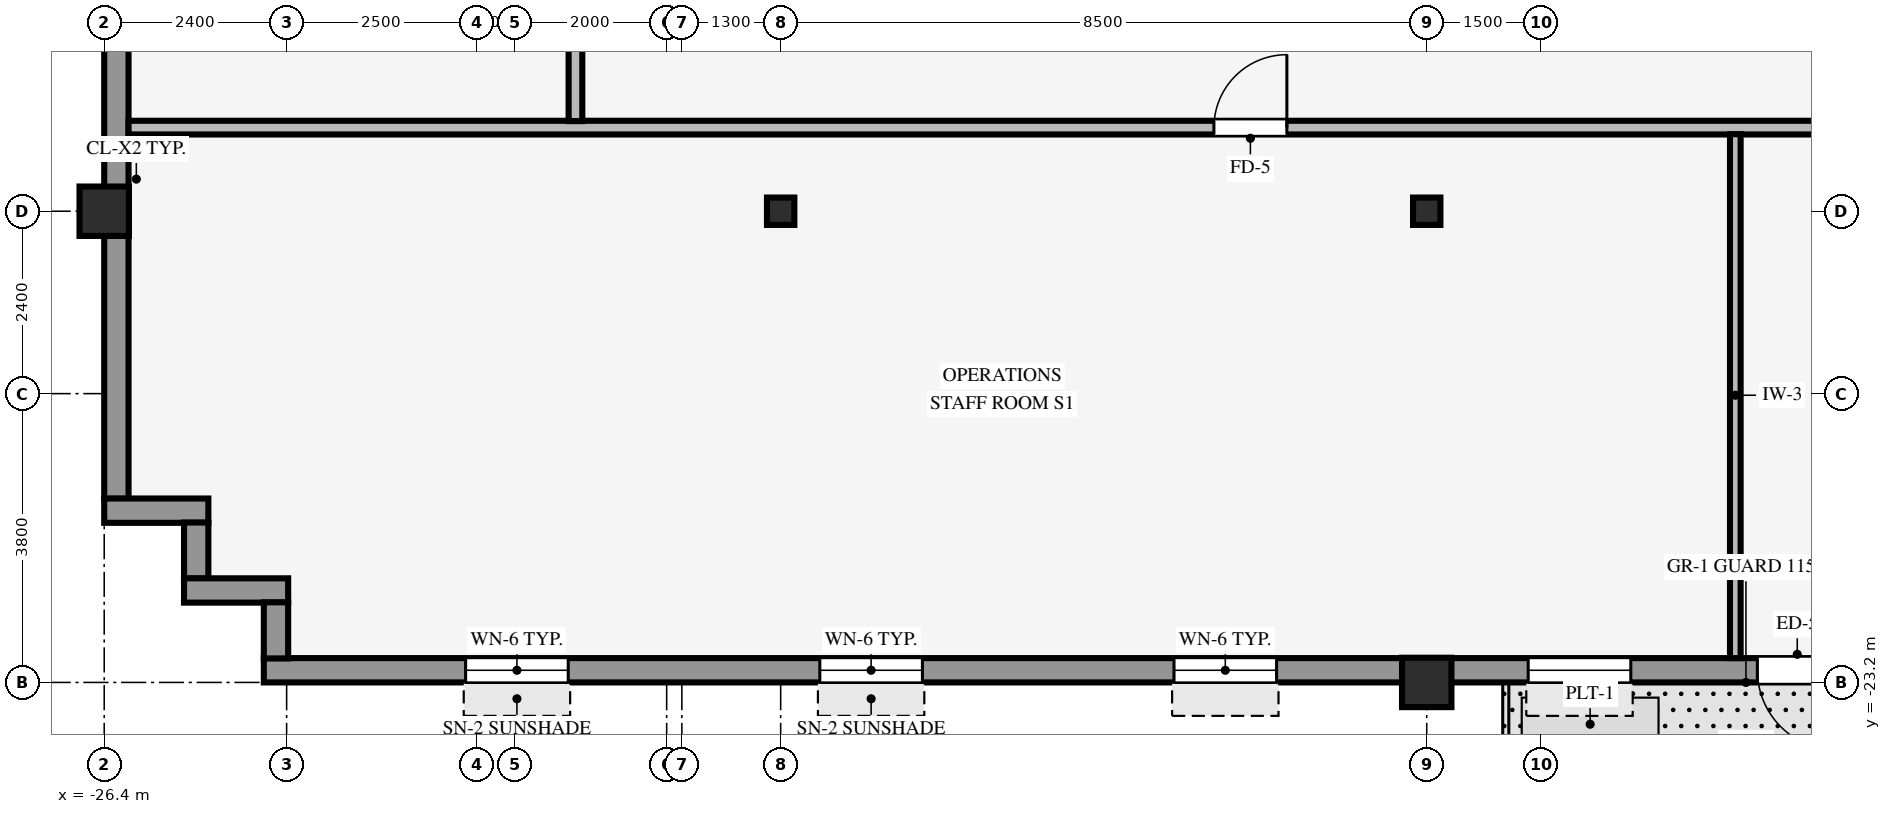
"""IFC4 building model, lengths in metres.
Left out: names, types, materials, properties, quantities, classifications, styles, units other than length and angle.
Written with IfcOpenShell. Run it as: python <this file> out.ifc"""

import sys

from ifc_helpers import new_model, si_unit, direction, frame, frame_2d, origin, origin_2d, place, context, subcontext, project, spatial, rectangle, hollow_rectangle, i_section, extrude, source, transform, mapped, element, fill, save


model = new_model("IFC4")
c1 = context("Model", 3, precision=1e-05, world=origin(), true_north=direction((0.0, 1.0)))
c2 = subcontext(c1, "Body", "Model", "MODEL_VIEW")
j1 = project(units=[si_unit("LENGTHUNIT", "METRE"), si_unit("PLANEANGLEUNIT", "RADIAN")], contexts=[c1])
p1 = place(None, origin())
s1 = spatial("IfcSite", under=j1, at=p1, CompositionType="ELEMENT")
p2 = place(p1, origin())
s2 = spatial("IfcBuilding", under=s1, at=p2, CompositionType="ELEMENT")
p3 = place(p2, frame((0.0, 0.0, 134.8)))
s3 = spatial("IfcBuildingStorey", under=s2, at=p3, CompositionType="ELEMENT", Elevation=134.8)
for number, where, z_axis, x_axis in (
    (1, (-26.4, -17.0, 0.0), (0.0, 0.0, 1.0), (1.0, 0.0, 0.0)),
    (2, (-9.0, -23.2, 0.0), (0.0, 0.0, 1.0), (1.0, 0.0, 0.0)),
):
    element("IfcColumn", number, at=place(p3, frame(where, z_axis=z_axis, x_axis=x_axis)), inside=s3, PredefinedType="COLUMN", context=c2, shape_type="SweptSolid", body=[
        extrude(hollow_rectangle(XDim=0.65, YDim=0.65, WallThickness=0.04, InnerFilletRadius=0.04, OuterFilletRadius=0.08, at=origin_2d()), origin(), (0.0, 0.0, 1.0), 3.37),
    ])
for number, where, z_axis, x_axis in (
    (3, (-17.5, -17.0, 0.0), (0.0, 0.0, 1.0), (1.0, 0.0, 0.0)),
    (4, (-9.0, -17.0, 0.0), (0.0, 0.0, 1.0), (1.0, 0.0, 0.0)),
):
    element("IfcColumn", number, at=place(p3, frame(where, z_axis=z_axis, x_axis=x_axis)), inside=s3, PredefinedType="COLUMN", context=c2, shape_type="SweptSolid", body=[
        extrude(i_section(OverallWidth=0.36, OverallDepth=0.36, WebThickness=0.021, FlangeThickness=0.021, FilletRadius=0.018, at=origin_2d()), origin(), (0.0, 0.0, 1.0), 3.37),
    ])
p4 = place(p3, frame((-24.3, -23.04, 0.0), z_axis=(0.0, 0.0, 1.0), x_axis=(1.0, 0.0, 0.0)))
e5 = element("IfcWall", 5, at=p4, inside=s3, PredefinedType="STANDARD", context=c2, shape_type="SweptSolid", body=[
    extrude(rectangle(XDim=48.6, YDim=0.32, at=frame_2d((24.3, 0.0))), origin(), (0.0, 0.0, 1.0), 2.705),
])
p5 = place(p4, frame((20.7, 0.0, 0.0), z_axis=(0.0, 0.0, 1.0), x_axis=(-1.0, 0.0, 0.0)))
e6 = element("IfcOpeningElement", 6, at=p5, cuts=e5, PredefinedType="OPENING", context=c2, shape_type="SweptSolid", body=[
    extrude(rectangle(XDim=1.05, YDim=2.1, at=frame_2d((0.525, 1.05))), frame((0.0, 0.17, 0.0), z_axis=(0.0, -1.0, 0.0), x_axis=(1.0, 0.0, 0.0)), (0.0, 0.0, 1.0), 0.34),
])
p6 = place(p4, frame((2.655, 0.0, 0.8)))
e7 = element("IfcOpeningElement", 7, at=p6, cuts=e5, PredefinedType="OPENING", context=c2, shape_type="SweptSolid", body=[
    extrude(rectangle(XDim=1.35, YDim=1.56, at=frame_2d((0.675, 0.78))), frame((0.0, 0.17, 0.0), z_axis=(0.0, -1.0, 0.0), x_axis=(1.0, 0.0, 0.0)), (0.0, 0.0, 1.0), 0.34),
])
p7 = place(p4, frame((7.315, 0.0, 0.8)))
e8 = element("IfcOpeningElement", 8, at=p7, cuts=e5, PredefinedType="OPENING", context=c2, shape_type="SweptSolid", body=[
    extrude(rectangle(XDim=1.35, YDim=1.56, at=frame_2d((0.675, 0.78))), frame((0.0, 0.17, 0.0), z_axis=(0.0, -1.0, 0.0), x_axis=(1.0, 0.0, 0.0)), (0.0, 0.0, 1.0), 0.34),
])
p8 = place(p4, frame((11.975, 0.0, 0.8)))
e9 = element("IfcOpeningElement", 9, at=p8, cuts=e5, PredefinedType="OPENING", context=c2, shape_type="SweptSolid", body=[
    extrude(rectangle(XDim=1.35, YDim=1.56, at=frame_2d((0.675, 0.78))), frame((0.0, 0.17, 0.0), z_axis=(0.0, -1.0, 0.0), x_axis=(1.0, 0.0, 0.0)), (0.0, 0.0, 1.0), 0.34),
])
p9 = place(p4, frame((16.635, 0.0, 0.8)))
e10 = element("IfcOpeningElement", 10, at=p9, cuts=e5, PredefinedType="OPENING", context=c2, shape_type="SweptSolid", body=[
    extrude(rectangle(XDim=1.35, YDim=1.56, at=frame_2d((0.675, 0.78))), frame((0.0, 0.17, 0.0), z_axis=(0.0, -1.0, 0.0), x_axis=(1.0, 0.0, 0.0)), (0.0, 0.0, 1.0), 0.34),
])
p10 = place(p4, frame((21.295, 0.0, 0.8)))
e11 = element("IfcOpeningElement", 11, at=p10, cuts=e5, PredefinedType="OPENING", context=c2, shape_type="SweptSolid", body=[
    extrude(rectangle(XDim=1.35, YDim=1.56, at=frame_2d((0.675, 0.78))), frame((0.0, 0.17, 0.0), z_axis=(0.0, -1.0, 0.0), x_axis=(1.0, 0.0, 0.0)), (0.0, 0.0, 1.0), 0.34),
])
p11 = place(p4, frame((25.955, 0.0, 0.8)))
e12 = element("IfcOpeningElement", 12, at=p11, cuts=e5, PredefinedType="OPENING", context=c2, shape_type="SweptSolid", body=[
    extrude(rectangle(XDim=1.35, YDim=1.56, at=frame_2d((0.675, 0.78))), frame((0.0, 0.17, 0.0), z_axis=(0.0, -1.0, 0.0), x_axis=(1.0, 0.0, 0.0)), (0.0, 0.0, 1.0), 0.34),
])
p12 = place(p4, frame((30.615, 0.0, 0.8)))
e13 = element("IfcOpeningElement", 13, at=p12, cuts=e5, PredefinedType="OPENING", context=c2, shape_type="SweptSolid", body=[
    extrude(rectangle(XDim=1.35, YDim=1.56, at=frame_2d((0.675, 0.78))), frame((0.0, 0.17, 0.0), z_axis=(0.0, -1.0, 0.0), x_axis=(1.0, 0.0, 0.0)), (0.0, 0.0, 1.0), 0.34),
])
p13 = place(p4, frame((35.275, 0.0, 0.8)))
e14 = element("IfcOpeningElement", 14, at=p13, cuts=e5, PredefinedType="OPENING", context=c2, shape_type="SweptSolid", body=[
    extrude(rectangle(XDim=1.35, YDim=1.56, at=frame_2d((0.675, 0.78))), frame((0.0, 0.17, 0.0), z_axis=(0.0, -1.0, 0.0), x_axis=(1.0, 0.0, 0.0)), (0.0, 0.0, 1.0), 0.34),
])
p14 = place(p4, frame((39.935, 0.0, 0.8)))
e15 = element("IfcOpeningElement", 15, at=p14, cuts=e5, PredefinedType="OPENING", context=c2, shape_type="SweptSolid", body=[
    extrude(rectangle(XDim=1.35, YDim=1.56, at=frame_2d((0.675, 0.78))), frame((0.0, 0.17, 0.0), z_axis=(0.0, -1.0, 0.0), x_axis=(1.0, 0.0, 0.0)), (0.0, 0.0, 1.0), 0.34),
])
p15 = place(p4, frame((44.595, 0.0, 0.8)))
e16 = element("IfcOpeningElement", 16, at=p15, cuts=e5, PredefinedType="OPENING", context=c2, shape_type="SweptSolid", body=[
    extrude(rectangle(XDim=1.35, YDim=1.56, at=frame_2d((0.675, 0.78))), frame((0.0, 0.17, 0.0), z_axis=(0.0, -1.0, 0.0), x_axis=(1.0, 0.0, 0.0)), (0.0, 0.0, 1.0), 0.34),
])
p16 = place(p3, frame((-26.24, -20.784, 0.0), z_axis=(0.0, 0.0, 1.0), x_axis=(0.0, 1.0, 0.0)))
e17 = element("IfcWall", 17, at=p16, inside=s3, PredefinedType="STANDARD", context=c2, shape_type="SweptSolid", body=[
    extrude(rectangle(XDim=41.568, YDim=0.32, at=frame_2d((20.784, 0.0))), origin(), (0.0, 0.0, 1.0), 2.705),
])
p17 = place(p16, frame((7.369, 0.0, 0.8)))
e18 = element("IfcOpeningElement", 18, at=p17, cuts=e17, PredefinedType="OPENING", context=c2, shape_type="SweptSolid", body=[
    extrude(rectangle(XDim=2.1, YDim=1.56, at=frame_2d((1.05, 0.78))), frame((0.0, 0.17, 0.0), z_axis=(0.0, -1.0, 0.0), x_axis=(1.0, 0.0, 0.0)), (0.0, 0.0, 1.0), 0.34),
])
p18 = place(p16, frame((12.315, 0.0, 0.8)))
e19 = element("IfcOpeningElement", 19, at=p18, cuts=e17, PredefinedType="OPENING", context=c2, shape_type="SweptSolid", body=[
    extrude(rectangle(XDim=2.1, YDim=1.56, at=frame_2d((1.05, 0.78))), frame((0.0, 0.17, 0.0), z_axis=(0.0, -1.0, 0.0), x_axis=(1.0, 0.0, 0.0)), (0.0, 0.0, 1.0), 0.34),
])
p19 = place(p16, frame((17.711, 0.0, 0.8)))
e20 = element("IfcOpeningElement", 20, at=p19, cuts=e17, PredefinedType="OPENING", context=c2, shape_type="SweptSolid", body=[
    extrude(rectangle(XDim=2.1, YDim=1.56, at=frame_2d((1.05, 0.78))), frame((0.0, 0.17, 0.0), z_axis=(0.0, -1.0, 0.0), x_axis=(1.0, 0.0, 0.0)), (0.0, 0.0, 1.0), 0.34),
])
p20 = place(p16, frame((22.207, 0.0, 0.8)))
e21 = element("IfcOpeningElement", 21, at=p20, cuts=e17, PredefinedType="OPENING", context=c2, shape_type="SweptSolid", body=[
    extrude(rectangle(XDim=2.1, YDim=1.56, at=frame_2d((1.05, 0.78))), frame((0.0, 0.17, 0.0), z_axis=(0.0, -1.0, 0.0), x_axis=(1.0, 0.0, 0.0)), (0.0, 0.0, 1.0), 0.34),
])
p21 = place(p16, frame((27.153, 0.0, 0.8)))
e22 = element("IfcOpeningElement", 22, at=p21, cuts=e17, PredefinedType="OPENING", context=c2, shape_type="SweptSolid", body=[
    extrude(rectangle(XDim=2.1, YDim=1.56, at=frame_2d((1.05, 0.78))), frame((0.0, 0.17, 0.0), z_axis=(0.0, -1.0, 0.0), x_axis=(1.0, 0.0, 0.0)), (0.0, 0.0, 1.0), 0.34),
])
p22 = place(p16, frame((32.099, 0.0, 0.8)))
e23 = element("IfcOpeningElement", 23, at=p22, cuts=e17, PredefinedType="OPENING", context=c2, shape_type="SweptSolid", body=[
    extrude(rectangle(XDim=2.1, YDim=1.56, at=frame_2d((1.05, 0.78))), frame((0.0, 0.17, 0.0), z_axis=(0.0, -1.0, 0.0), x_axis=(1.0, 0.0, 0.0)), (0.0, 0.0, 1.0), 0.34),
])
p23 = place(p3, frame((-26.4, -20.94, 0.0), z_axis=(0.0, 0.0, 1.0), x_axis=(1.0, 0.0, 0.0)))
e24 = element("IfcWall", 24, at=p23, inside=s3, PredefinedType="STANDARD", context=c2, shape_type="SweptSolid", body=[
    extrude(rectangle(XDim=1.37, YDim=0.32, at=frame_2d((0.685, 0.0))), origin(), (0.0, 0.0, 1.0), 3.36),
])
p24 = place(p3, frame((-25.19, -21.834, 0.0), z_axis=(0.0, 0.0, 1.0), x_axis=(0.0, 1.0, 0.0)))
e25 = element("IfcWall", 25, at=p24, inside=s3, PredefinedType="STANDARD", context=c2, shape_type="SweptSolid", body=[
    extrude(rectangle(XDim=0.738, YDim=0.32, at=frame_2d((0.369, 0.0))), origin(), (0.0, 0.0, 1.0), 3.36),
])
p25 = place(p3, frame((-25.35, -21.99, 0.0), z_axis=(0.0, 0.0, 1.0), x_axis=(1.0, 0.0, 0.0)))
e26 = element("IfcWall", 26, at=p25, inside=s3, PredefinedType="STANDARD", context=c2, shape_type="SweptSolid", body=[
    extrude(rectangle(XDim=1.37, YDim=0.32, at=frame_2d((0.685, 0.0))), origin(), (0.0, 0.0, 1.0), 3.36),
])
p26 = place(p3, frame((-24.14, -22.884, 0.0), z_axis=(0.0, 0.0, 1.0), x_axis=(0.0, 1.0, 0.0)))
e27 = element("IfcWall", 27, at=p26, inside=s3, PredefinedType="STANDARD", context=c2, shape_type="SweptSolid", body=[
    extrude(rectangle(XDim=0.738, YDim=0.32, at=frame_2d((0.369, 0.0))), origin(), (0.0, 0.0, 1.0), 3.36),
])
p27 = place(p3, frame((-26.08, -15.9, 0.0), z_axis=(0.0, 0.0, 1.0), x_axis=(1.0, 0.0, 0.0)))
e28 = element("IfcWall", 28, at=p27, inside=s3, PredefinedType="PARTITIONING", context=c2, shape_type="SweptSolid", body=[
    extrude(rectangle(XDim=52.16, YDim=0.18, at=frame_2d((26.08, 0.0))), origin(), (0.0, 0.0, 1.0), 3.36),
])
p28 = place(p27, frame((14.28, 0.0, 0.0)))
e29 = element("IfcOpeningElement", 29, at=p28, cuts=e28, PredefinedType="OPENING", context=c2, shape_type="SweptSolid", body=[
    extrude(rectangle(XDim=0.96, YDim=2.1, at=frame_2d((0.48, 1.05))), frame((0.0, 0.1, 0.0), z_axis=(0.0, -1.0, 0.0), x_axis=(1.0, 0.0, 0.0)), (0.0, 0.0, 1.0), 0.2),
])
p29 = place(p27, frame((40.5, 0.0, 0.0)))
e30 = element("IfcOpeningElement", 30, at=p29, cuts=e28, PredefinedType="OPENING", context=c2, shape_type="SweptSolid", body=[
    extrude(rectangle(XDim=0.96, YDim=2.1, at=frame_2d((0.48, 1.05))), frame((0.0, 0.1, 0.0), z_axis=(0.0, -1.0, 0.0), x_axis=(1.0, 0.0, 0.0)), (0.0, 0.0, 1.0), 0.2),
])
p30 = place(p3, frame((-20.2, -15.814, 0.0), z_axis=(0.0, 0.0, 1.0), x_axis=(0.0, 1.0, 0.0)))
e31 = element("IfcWall", 31, at=p30, inside=s3, PredefinedType="PARTITIONING", context=c2, shape_type="SweptSolid", body=[
    extrude(rectangle(XDim=31.628, YDim=0.18, at=frame_2d((15.814, 0.0))), origin(), (0.0, 0.0, 1.0), 3.36),
])
p31 = place(p30, frame((20.334, 0.0, 0.0)))
e32 = element("IfcOpeningElement", 32, at=p31, cuts=e31, PredefinedType="OPENING", context=c2, shape_type="SweptSolid", body=[
    extrude(rectangle(XDim=0.96, YDim=2.1, at=frame_2d((0.48, 1.05))), frame((0.0, 0.1, 0.0), z_axis=(0.0, -1.0, 0.0), x_axis=(1.0, 0.0, 0.0)), (0.0, 0.0, 1.0), 0.2),
])
p32 = place(p30, frame((6.834, 0.0, 0.0)))
e33 = element("IfcOpeningElement", 33, at=p32, cuts=e31, PredefinedType="OPENING", context=c2, shape_type="SweptSolid", body=[
    extrude(rectangle(XDim=0.96, YDim=2.1, at=frame_2d((0.48, 1.05))), frame((0.0, 0.1, 0.0), z_axis=(0.0, -1.0, 0.0), x_axis=(1.0, 0.0, 0.0)), (0.0, 0.0, 1.0), 0.2),
])
p33 = place(p3, frame((-4.94, -22.88, 0.0), z_axis=(0.0, 0.0, 1.0), x_axis=(0.0, 1.0, 0.0)))
e34 = element("IfcWall", 34, at=p33, inside=s3, PredefinedType="PARTITIONING", context=c2, shape_type="SweptSolid", body=[
    extrude(rectangle(XDim=6.894, YDim=0.14, at=frame_2d((3.447, 0.0))), origin(), (0.0, 0.0, 1.0), 3.36),
])
m1 = source(origin(), c2, "Body", "SweptSolid", [
    extrude(rectangle(XDim=1.05, YDim=2.1, at=frame_2d((0.525, 1.05))), frame((0.0, 0.025, 0.0), z_axis=(0.0, -1.0, 0.0), x_axis=(1.0, 0.0, 0.0)), (0.0, 0.0, 1.0), 0.05),
])
p34 = place(p5, origin())
e35 = element("IfcDoor", 35, at=p34, inside=s3, OperationType="SINGLE_SWING_LEFT", PredefinedType="DOOR", context=c2, shape_type="MappedRepresentation", body=[
    mapped(m1, transform((0.0, 0.0, 0.0), scale=1.0)),
])
fill(e6, e35)
m2 = source(origin(), c2, "Body", "SweptSolid", [
    extrude(rectangle(XDim=1.35, YDim=1.56, at=frame_2d((0.675, 0.78))), frame((0.0, 0.03, 0.0), z_axis=(0.0, -1.0, 0.0), x_axis=(1.0, 0.0, 0.0)), (0.0, 0.0, 1.0), 0.06),
])
p35 = place(p6, origin())
e36 = element("IfcWindow", 36, at=p35, inside=s3, PartitioningType="SINGLE_PANEL", PredefinedType="WINDOW", context=c2, shape_type="MappedRepresentation", body=[
    mapped(m2, transform((0.0, 0.0, 0.0), scale=1.0)),
])
fill(e7, e36)
p36 = place(p7, origin())
e37 = element("IfcWindow", 37, at=p36, inside=s3, PartitioningType="SINGLE_PANEL", PredefinedType="WINDOW", context=c2, shape_type="MappedRepresentation", body=[
    mapped(m2, transform((0.0, 0.0, 0.0), scale=1.0)),
])
fill(e8, e37)
p37 = place(p8, origin())
e38 = element("IfcWindow", 38, at=p37, inside=s3, PartitioningType="SINGLE_PANEL", PredefinedType="WINDOW", context=c2, shape_type="MappedRepresentation", body=[
    mapped(m2, transform((0.0, 0.0, 0.0), scale=1.0)),
])
fill(e9, e38)
p38 = place(p9, origin())
e39 = element("IfcWindow", 39, at=p38, inside=s3, PartitioningType="SINGLE_PANEL", PredefinedType="WINDOW", context=c2, shape_type="MappedRepresentation", body=[
    mapped(m2, transform((0.0, 0.0, 0.0), scale=1.0)),
])
fill(e10, e39)
m3 = source(origin(), c2, "Body", "SweptSolid", [
    extrude(rectangle(XDim=0.96, YDim=2.1, at=frame_2d((0.48, 1.05))), frame((0.0, 0.025, 0.0), z_axis=(0.0, -1.0, 0.0), x_axis=(1.0, 0.0, 0.0)), (0.0, 0.0, 1.0), 0.05),
])
p39 = place(p28, origin())
e40 = element("IfcDoor", 40, at=p39, inside=s3, OperationType="SINGLE_SWING_RIGHT", PredefinedType="DOOR", context=c2, shape_type="MappedRepresentation", body=[
    mapped(m3, transform((0.0, 0.0, 0.0), scale=1.0)),
])
fill(e29, e40)
save(model, sys.argv[1])
